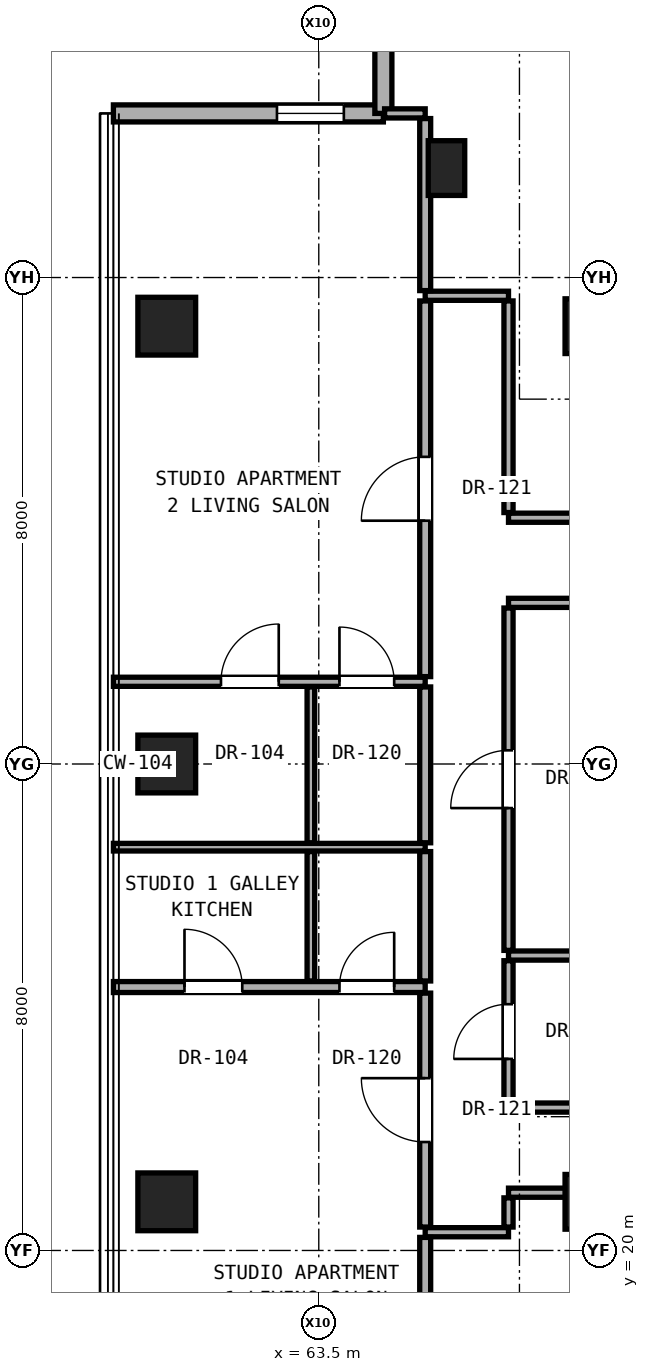
"""IFC4 building model, lengths in metres.
Left out: names, types, materials, properties, quantities, classifications, styles, units other than length and angle.
Written with IfcOpenShell. Run it as: python <this file> out.ifc"""

import sys

from ifc_helpers import new_model, si_unit, direction, frame, frame_2d, origin, origin_2d, place, context, subcontext, project, spatial, rectangle, hollow_rectangle, extrude, element, fill, save


model = new_model("IFC4")
c1 = context("Model", 3, precision=1e-05, world=origin(), true_north=direction((0.0, 1.0)))
c2 = subcontext(c1, "Body", "Model", "MODEL_VIEW")
j1 = project(units=[si_unit("LENGTHUNIT", "METRE"), si_unit("PLANEANGLEUNIT", "RADIAN")], contexts=[c1])
p1 = place(None, origin())
s1 = spatial("IfcSite", under=j1, at=p1, CompositionType="ELEMENT")
p2 = place(p1, origin())
s2 = spatial("IfcBuilding", under=s1, at=p2, CompositionType="ELEMENT")
p3 = place(p2, frame((0.0, 0.0, 183.65)))
s3 = spatial("IfcBuildingStorey", under=s2, at=p3, CompositionType="ELEMENT", Elevation=183.65)
for number, where, z_axis, x_axis in (
    (1, (68.0, 20.8, 0.0), (0.0, 0.0, 1.0), (1.0, 0.0, 0.0)),
    (2, (68.0, 35.2, 0.0), (0.0, 0.0, 1.0), (1.0, 0.0, 0.0)),
):
    element("IfcColumn", number, at=place(p3, frame(where, z_axis=z_axis, x_axis=x_axis)), inside=s3, PredefinedType="COLUMN", context=c2, shape_type="SweptSolid", body=[
        extrude(rectangle(XDim=0.9, YDim=0.9, at=origin_2d()), origin(), (0.0, 0.0, 1.0), 3.25),
    ])
for number, where, z_axis, x_axis in (
    (3, (61.0, 20.8, 0.0), (0.0, 0.0, 1.0), (1.0, 0.0, 0.0)),
    (4, (61.0, 28.0, 0.0), (0.0, 0.0, 1.0), (1.0, 0.0, 0.0)),
    (5, (61.0, 35.2, 0.0), (0.0, 0.0, 1.0), (1.0, 0.0, 0.0)),
):
    element("IfcColumn", number, at=place(p3, frame(where, z_axis=z_axis, x_axis=x_axis)), inside=s3, PredefinedType="COLUMN", context=c2, shape_type="SweptSolid", body=[
        extrude(hollow_rectangle(XDim=0.95, YDim=0.95, WallThickness=0.05, at=origin_2d()), origin(), (0.0, 0.0, 1.0), 3.25),
    ])
p4 = place(p3, frame((65.6, 37.8, 0.0), z_axis=(0.0, 0.0, 1.0), x_axis=(1.0, 0.0, 0.0)))
e6 = element("IfcColumn", 6, at=p4, inside=s3, PredefinedType="PILASTER", context=c2, shape_type="SweptSolid", body=[
    extrude(rectangle(XDim=0.6, YDim=0.9, at=origin_2d()), origin(), (0.0, 0.0, 1.0), 3.25),
])
p5 = place(p3, frame((64.562, 38.699, 0.0), z_axis=(0.0, 0.0, 1.0), x_axis=(-1.0, 0.0, 0.0)))
e7 = element("IfcWall", 7, at=p5, inside=s3, PredefinedType="SOLIDWALL", context=c2, shape_type="SweptSolid", body=[
    extrude(rectangle(XDim=4.44, YDim=0.28, at=frame_2d((2.22, 0.0))), origin(), (0.0, 0.0, 1.0), 3.03),
])
p6 = place(p5, frame((0.65, 0.0, 0.85)))
e8 = element("IfcOpeningElement", 8, at=p6, cuts=e7, PredefinedType="OPENING", context=c2, shape_type="SweptSolid", body=[
    extrude(rectangle(XDim=1.1, YDim=2.0, at=frame_2d((0.55, 1.0))), frame((0.0, 0.15, 0.0), z_axis=(0.0, -1.0, 0.0), x_axis=(1.0, 0.0, 0.0)), (0.0, 0.0, 1.0), 0.3),
])
p7 = place(p3, frame((64.562, 43.138, 0.0), z_axis=(0.0, 0.0, 1.0), x_axis=(0.0, -1.0, 0.0)))
e9 = element("IfcWall", 9, at=p7, inside=s3, PredefinedType="SOLIDWALL", context=c2, shape_type="SweptSolid", body=[
    extrude(rectangle(XDim=4.44, YDim=0.28, at=frame_2d((2.22, 0.0))), origin(), (0.0, 0.0, 1.0), 3.03),
])
p8 = place(p3, frame((65.25, 20.3, 0.0), z_axis=(0.0, 0.0, 1.0), x_axis=(1.0, 0.0, 0.0)))
e10 = element("IfcWall", 10, at=p8, inside=s3, PredefinedType="PARTITIONING", context=c2, shape_type="SweptSolid", body=[
    extrude(rectangle(XDim=1.37, YDim=0.15, at=frame_2d((0.685, 0.0))), origin(), (0.0, 0.0, 1.0), 3.05),
])
p9 = place(p3, frame((66.62, 20.95, 0.0), z_axis=(0.0, 0.0, 1.0), x_axis=(1.0, 0.0, 0.0)))
e11 = element("IfcWall", 11, at=p9, inside=s3, PredefinedType="PARTITIONING", context=c2, shape_type="SweptSolid", body=[
    extrude(rectangle(XDim=1.11, YDim=0.15, at=frame_2d((0.555, 0.0))), origin(), (0.0, 0.0, 1.0), 2.442),
])
p10 = place(p3, frame((66.62, 22.35, 0.0), z_axis=(0.0, 0.0, 1.0), x_axis=(1.0, 0.0, 0.0)))
e12 = element("IfcWall", 12, at=p10, inside=s3, PredefinedType="PARTITIONING", context=c2, shape_type="SweptSolid", body=[
    extrude(rectangle(XDim=10.14, YDim=0.15, at=frame_2d((5.07, 0.0))), origin(), (0.0, 0.0, 1.0), 2.186),
])
p11 = place(p3, frame((60.123, 24.332, 0.0), z_axis=(0.0, 0.0, 1.0), x_axis=(1.0, 0.0, 0.0)))
e13 = element("IfcWall", 13, at=p11, inside=s3, PredefinedType="PARTITIONING", context=c2, shape_type="SweptSolid", body=[
    extrude(rectangle(XDim=5.127, YDim=0.18, at=frame_2d((2.563, 0.0))), origin(), (0.0, 0.0, 1.0), 2.269),
])
p12 = place(p11, frame((1.168, 0.0, 0.0)))
e14 = element("IfcOpeningElement", 14, at=p12, cuts=e13, PredefinedType="OPENING", context=c2, shape_type="SweptSolid", body=[
    extrude(rectangle(XDim=0.95, YDim=2.15, at=frame_2d((0.475, 1.075))), frame((0.0, 0.1, 0.0), z_axis=(0.0, -1.0, 0.0), x_axis=(1.0, 0.0, 0.0)), (0.0, 0.0, 1.0), 0.2),
])
p13 = place(p11, frame((3.717, 0.0, 0.0)))
e15 = element("IfcOpeningElement", 15, at=p13, cuts=e13, PredefinedType="OPENING", context=c2, shape_type="SweptSolid", body=[
    extrude(rectangle(XDim=0.9, YDim=2.1, at=frame_2d((0.45, 1.05))), frame((0.0, 0.1, 0.0), z_axis=(0.0, -1.0, 0.0), x_axis=(1.0, 0.0, 0.0)), (0.0, 0.0, 1.0), 0.2),
])
p14 = place(p3, frame((66.62, 24.85, 0.0), z_axis=(0.0, 0.0, 1.0), x_axis=(1.0, 0.0, 0.0)))
e16 = element("IfcWall", 16, at=p14, inside=s3, PredefinedType="PARTITIONING", context=c2, shape_type="SweptSolid", body=[
    extrude(rectangle(XDim=3.13, YDim=0.15, at=frame_2d((1.565, 0.0))), origin(), (0.0, 0.0, 1.0), 2.186),
])
p15 = place(p3, frame((60.123, 26.632, 0.0), z_axis=(0.0, 0.0, 1.0), x_axis=(1.0, 0.0, 0.0)))
e17 = element("IfcWall", 17, at=p15, inside=s3, PredefinedType="PARTITIONING", context=c2, shape_type="SweptSolid", body=[
    extrude(rectangle(XDim=5.127, YDim=0.125, at=frame_2d((2.563, 0.0))), origin(), (0.0, 0.0, 1.0), 2.269),
])
p16 = place(p3, frame((60.123, 29.352, 0.0), z_axis=(0.0, 0.0, 1.0), x_axis=(1.0, 0.0, 0.0)))
e18 = element("IfcWall", 18, at=p16, inside=s3, PredefinedType="PARTITIONING", context=c2, shape_type="SweptSolid", body=[
    extrude(rectangle(XDim=5.127, YDim=0.15, at=frame_2d((2.563, 0.0))), origin(), (0.0, 0.0, 1.0), 2.269),
])
p17 = place(p16, frame((1.769, 0.0, 0.0)))
e19 = element("IfcOpeningElement", 19, at=p17, cuts=e18, PredefinedType="OPENING", context=c2, shape_type="SweptSolid", body=[
    extrude(rectangle(XDim=0.95, YDim=2.15, at=frame_2d((0.475, 1.075))), frame((0.0, 0.085, 0.0), z_axis=(0.0, -1.0, 0.0), x_axis=(1.0, 0.0, 0.0)), (0.0, 0.0, 1.0), 0.17),
])
p18 = place(p16, frame((3.717, 0.0, 0.0)))
e20 = element("IfcOpeningElement", 20, at=p18, cuts=e18, PredefinedType="OPENING", context=c2, shape_type="SweptSolid", body=[
    extrude(rectangle(XDim=0.9, YDim=2.1, at=frame_2d((0.45, 1.05))), frame((0.0, 0.085, 0.0), z_axis=(0.0, -1.0, 0.0), x_axis=(1.0, 0.0, 0.0)), (0.0, 0.0, 1.0), 0.17),
])
p19 = place(p3, frame((66.62, 30.65, 0.0), z_axis=(0.0, 0.0, 1.0), x_axis=(1.0, 0.0, 0.0)))
e21 = element("IfcWall", 21, at=p19, inside=s3, PredefinedType="PARTITIONING", context=c2, shape_type="SweptSolid", body=[
    extrude(rectangle(XDim=10.14, YDim=0.15, at=frame_2d((5.07, 0.0))), origin(), (0.0, 0.0, 1.0), 2.186),
])
p20 = place(p19, frame((6.14, 0.0, 0.0)))
e22 = element("IfcOpeningElement", 22, at=p20, cuts=e21, PredefinedType="OPENING", context=c2, shape_type="SweptSolid", body=[
    extrude(rectangle(XDim=0.95, YDim=2.15, at=frame_2d((0.475, 1.075))), frame((0.0, 0.085, 0.0), z_axis=(0.0, -1.0, 0.0), x_axis=(1.0, 0.0, 0.0)), (0.0, 0.0, 1.0), 0.17),
])
p21 = place(p3, frame((66.62, 32.05, 0.0), z_axis=(0.0, 0.0, 1.0), x_axis=(1.0, 0.0, 0.0)))
e23 = element("IfcWall", 23, at=p21, inside=s3, PredefinedType="PARTITIONING", context=c2, shape_type="SweptSolid", body=[
    extrude(rectangle(XDim=2.18, YDim=0.15, at=frame_2d((1.09, 0.0))), origin(), (0.0, 0.0, 1.0), 2.186),
])
p22 = place(p3, frame((65.25, 35.7, 0.0), z_axis=(0.0, 0.0, 1.0), x_axis=(1.0, 0.0, 0.0)))
e24 = element("IfcWall", 24, at=p22, inside=s3, PredefinedType="PARTITIONING", context=c2, shape_type="SweptSolid", body=[
    extrude(rectangle(XDim=1.37, YDim=0.15, at=frame_2d((0.685, 0.0))), origin(), (0.0, 0.0, 1.0), 3.05),
])
p23 = place(p3, frame((64.582, 38.699, 0.0), z_axis=(0.0, 0.0, 1.0), x_axis=(1.0, 0.0, 0.0)))
e25 = element("IfcWall", 25, at=p23, inside=s3, PredefinedType="PARTITIONING", context=c2, shape_type="SweptSolid", body=[
    extrude(rectangle(XDim=0.668, YDim=0.15, at=frame_2d((0.334, 0.0))), origin(), (0.0, 0.0, 1.0), 3.05),
])
p24 = place(p3, frame((63.37, 24.432, 0.0), z_axis=(0.0, 0.0, 1.0), x_axis=(0.0, 1.0, 0.0)))
e26 = element("IfcWall", 26, at=p24, inside=s3, PredefinedType="PARTITIONING", context=c2, shape_type="SweptSolid", body=[
    extrude(rectangle(XDim=2.128, YDim=0.125, at=frame_2d((1.064, 0.0))), origin(), (0.0, 0.0, 1.0), 3.05),
])
p25 = place(p3, frame((63.37, 26.705, 0.0), z_axis=(0.0, 0.0, 1.0), x_axis=(0.0, 1.0, 0.0)))
e27 = element("IfcWall", 27, at=p25, inside=s3, PredefinedType="PARTITIONING", context=c2, shape_type="SweptSolid", body=[
    extrude(rectangle(XDim=2.562, YDim=0.125, at=frame_2d((1.281, 0.0))), origin(), (0.0, 0.0, 1.0), 2.346),
])
p26 = place(p3, frame((65.25, 17.401, 0.0), z_axis=(0.0, 0.0, 1.0), x_axis=(0.0, 1.0, 0.0)))
e28 = element("IfcWall", 28, at=p26, inside=s3, PredefinedType="PARTITIONING", context=c2, shape_type="SweptSolid", body=[
    extrude(rectangle(XDim=2.814, YDim=0.18, at=frame_2d((1.407, 0.0))), origin(), (0.0, 0.0, 1.0), 2.493),
])
p27 = place(p3, frame((65.25, 20.385, 0.0), z_axis=(0.0, 0.0, 1.0), x_axis=(0.0, 1.0, 0.0)))
e29 = element("IfcWall", 29, at=p27, inside=s3, PredefinedType="PARTITIONING", context=c2, shape_type="SweptSolid", body=[
    extrude(rectangle(XDim=3.847, YDim=0.18, at=frame_2d((1.923, 0.0))), origin(), (0.0, 0.0, 1.0), 2.442),
])
p28 = place(p27, frame((1.398, 0.0, 0.0)))
e30 = element("IfcOpeningElement", 30, at=p28, cuts=e29, PredefinedType="OPENING", context=c2, shape_type="SweptSolid", body=[
    extrude(rectangle(XDim=1.05, YDim=2.2, at=frame_2d((0.525, 1.1))), frame((0.0, 0.1, 0.0), z_axis=(0.0, -1.0, 0.0), x_axis=(1.0, 0.0, 0.0)), (0.0, 0.0, 1.0), 0.2),
])
p29 = place(p3, frame((65.25, 24.432, 0.0), z_axis=(0.0, 0.0, 1.0), x_axis=(0.0, 1.0, 0.0)))
e31 = element("IfcWall", 31, at=p29, inside=s3, PredefinedType="PARTITIONING", context=c2, shape_type="SweptSolid", body=[
    extrude(rectangle(XDim=2.128, YDim=0.18, at=frame_2d((1.064, 0.0))), origin(), (0.0, 0.0, 1.0), 3.05),
])
p30 = place(p3, frame((65.25, 26.705, 0.0), z_axis=(0.0, 0.0, 1.0), x_axis=(0.0, 1.0, 0.0)))
e32 = element("IfcWall", 32, at=p30, inside=s3, PredefinedType="PARTITIONING", context=c2, shape_type="SweptSolid", body=[
    extrude(rectangle(XDim=2.562, YDim=0.18, at=frame_2d((1.281, 0.0))), origin(), (0.0, 0.0, 1.0), 2.346),
])
p31 = place(p3, frame((65.25, 29.437, 0.0), z_axis=(0.0, 0.0, 1.0), x_axis=(0.0, 1.0, 0.0)))
e33 = element("IfcWall", 33, at=p31, inside=s3, PredefinedType="PARTITIONING", context=c2, shape_type="SweptSolid", body=[
    extrude(rectangle(XDim=6.178, YDim=0.18, at=frame_2d((3.089, 0.0))), origin(), (0.0, 0.0, 1.0), 2.442),
])
p32 = place(p31, frame((2.564, 0.0, 0.0)))
e34 = element("IfcOpeningElement", 34, at=p32, cuts=e33, PredefinedType="OPENING", context=c2, shape_type="SweptSolid", body=[
    extrude(rectangle(XDim=1.05, YDim=2.2, at=frame_2d((0.525, 1.1))), frame((0.0, 0.1, 0.0), z_axis=(0.0, -1.0, 0.0), x_axis=(1.0, 0.0, 0.0)), (0.0, 0.0, 1.0), 0.2),
])
p33 = place(p3, frame((65.25, 35.785, 0.0), z_axis=(0.0, 0.0, 1.0), x_axis=(0.0, 1.0, 0.0)))
e35 = element("IfcWall", 35, at=p33, inside=s3, PredefinedType="PARTITIONING", context=c2, shape_type="SweptSolid", body=[
    extrude(rectangle(XDim=2.829, YDim=0.18, at=frame_2d((1.415, 0.0))), origin(), (0.0, 0.0, 1.0), 2.493),
])
p34 = place(p3, frame((66.62, 20.385, 0.0), z_axis=(0.0, 0.0, 1.0), x_axis=(0.0, 1.0, 0.0)))
e36 = element("IfcWall", 36, at=p34, inside=s3, PredefinedType="PARTITIONING", context=c2, shape_type="SweptSolid", body=[
    extrude(rectangle(XDim=0.48, YDim=0.15, at=frame_2d((0.24, 0.0))), origin(), (0.0, 0.0, 1.0), 2.442),
])
p35 = place(p3, frame((66.62, 22.435, 0.0), z_axis=(0.0, 0.0, 1.0), x_axis=(0.0, 1.0, 0.0)))
e37 = element("IfcWall", 37, at=p35, inside=s3, PredefinedType="PARTITIONING", context=c2, shape_type="SweptSolid", body=[
    extrude(rectangle(XDim=2.33, YDim=0.15, at=frame_2d((1.165, 0.0))), origin(), (0.0, 0.0, 1.0), 3.05),
])
p36 = place(p35, frame((0.715, 0.0, 0.0)))
e38 = element("IfcOpeningElement", 38, at=p36, cuts=e37, PredefinedType="OPENING", context=c2, shape_type="SweptSolid", body=[
    extrude(rectangle(XDim=0.9, YDim=2.1, at=frame_2d((0.45, 1.05))), frame((0.0, 0.085, 0.0), z_axis=(0.0, -1.0, 0.0), x_axis=(1.0, 0.0, 0.0)), (0.0, 0.0, 1.0), 0.17),
])
p37 = place(p3, frame((66.62, 24.935, 0.0), z_axis=(0.0, 0.0, 1.0), x_axis=(0.0, 1.0, 0.0)))
e39 = element("IfcWall", 39, at=p37, inside=s3, PredefinedType="PARTITIONING", context=c2, shape_type="SweptSolid", body=[
    extrude(rectangle(XDim=5.63, YDim=0.15, at=frame_2d((2.815, 0.0))), origin(), (0.0, 0.0, 1.0), 2.346),
])
p38 = place(p37, frame((2.34, 0.0, 0.0)))
e40 = element("IfcOpeningElement", 40, at=p38, cuts=e39, PredefinedType="OPENING", context=c2, shape_type="SweptSolid", body=[
    extrude(rectangle(XDim=0.95, YDim=2.15, at=frame_2d((0.475, 1.075))), frame((0.0, 0.085, 0.0), z_axis=(0.0, -1.0, 0.0), x_axis=(1.0, 0.0, 0.0)), (0.0, 0.0, 1.0), 0.17),
])
p39 = place(p3, frame((66.62, 32.135, 0.0), z_axis=(0.0, 0.0, 1.0), x_axis=(0.0, 1.0, 0.0)))
e41 = element("IfcWall", 41, at=p39, inside=s3, PredefinedType="PARTITIONING", context=c2, shape_type="SweptSolid", body=[
    extrude(rectangle(XDim=3.48, YDim=0.15, at=frame_2d((1.74, 0.0))), origin(), (0.0, 0.0, 1.0), 2.442),
])
p40 = place(p6, origin())
e42 = element("IfcWindow", 42, at=p40, inside=s3, PartitioningType="SINGLE_PANEL", PredefinedType="WINDOW", context=c2, shape_type="SweptSolid", body=[
    extrude(rectangle(XDim=1.1, YDim=2.0, at=frame_2d((0.55, 1.0))), frame((0.0, 0.03, 0.0), z_axis=(0.0, -1.0, 0.0), x_axis=(1.0, 0.0, 0.0)), (0.0, 0.0, 1.0), 0.06),
])
fill(e8, e42)
p41 = place(p36, origin())
e43 = element("IfcDoor", 43, at=p41, inside=s3, OperationType="SINGLE_SWING_LEFT", PredefinedType="DOOR", context=c2, shape_type="SweptSolid", body=[
    extrude(rectangle(XDim=0.9, YDim=2.1, at=frame_2d((0.45, 1.05))), frame((0.0, 0.025, 0.0), z_axis=(0.0, -1.0, 0.0), x_axis=(1.0, 0.0, 0.0)), (0.0, 0.0, 1.0), 0.05),
])
fill(e38, e43)
p42 = place(p28, origin())
e44 = element("IfcDoor", 44, at=p42, inside=s3, OperationType="SINGLE_SWING_RIGHT", PredefinedType="DOOR", context=c2, shape_type="SweptSolid", body=[
    extrude(rectangle(XDim=1.05, YDim=2.2, at=frame_2d((0.525, 1.1))), frame((0.0, 0.025, 0.0), z_axis=(0.0, -1.0, 0.0), x_axis=(1.0, 0.0, 0.0)), (0.0, 0.0, 1.0), 0.05),
])
fill(e30, e44)
p43 = place(p12, origin())
e45 = element("IfcDoor", 45, at=p43, inside=s3, OperationType="SINGLE_SWING_LEFT", PredefinedType="DOOR", context=c2, shape_type="SweptSolid", body=[
    extrude(rectangle(XDim=0.95, YDim=2.15, at=frame_2d((0.475, 1.075))), frame((0.0, 0.025, 0.0), z_axis=(0.0, -1.0, 0.0), x_axis=(1.0, 0.0, 0.0)), (0.0, 0.0, 1.0), 0.05),
])
fill(e14, e45)
p44 = place(p13, origin())
e46 = element("IfcDoor", 46, at=p44, inside=s3, OperationType="SINGLE_SWING_RIGHT", PredefinedType="DOOR", context=c2, shape_type="SweptSolid", body=[
    extrude(rectangle(XDim=0.9, YDim=2.1, at=frame_2d((0.45, 1.05))), frame((0.0, 0.025, 0.0), z_axis=(0.0, -1.0, 0.0), x_axis=(1.0, 0.0, 0.0)), (0.0, 0.0, 1.0), 0.05),
])
fill(e15, e46)
p45 = place(p32, origin())
e47 = element("IfcDoor", 47, at=p45, inside=s3, OperationType="SINGLE_SWING_LEFT", PredefinedType="DOOR", context=c2, shape_type="SweptSolid", body=[
    extrude(rectangle(XDim=1.05, YDim=2.2, at=frame_2d((0.525, 1.1))), frame((0.0, 0.025, 0.0), z_axis=(0.0, -1.0, 0.0), x_axis=(1.0, 0.0, 0.0)), (0.0, 0.0, 1.0), 0.05),
])
fill(e34, e47)
p46 = place(p17, origin())
e48 = element("IfcDoor", 48, at=p46, inside=s3, OperationType="SINGLE_SWING_RIGHT", PredefinedType="DOOR", context=c2, shape_type="SweptSolid", body=[
    extrude(rectangle(XDim=0.95, YDim=2.15, at=frame_2d((0.475, 1.075))), frame((0.0, 0.025, 0.0), z_axis=(0.0, -1.0, 0.0), x_axis=(1.0, 0.0, 0.0)), (0.0, 0.0, 1.0), 0.05),
])
fill(e19, e48)
p47 = place(p18, origin())
e49 = element("IfcDoor", 49, at=p47, inside=s3, OperationType="SINGLE_SWING_LEFT", PredefinedType="DOOR", context=c2, shape_type="SweptSolid", body=[
    extrude(rectangle(XDim=0.9, YDim=2.1, at=frame_2d((0.45, 1.05))), frame((0.0, 0.025, 0.0), z_axis=(0.0, -1.0, 0.0), x_axis=(1.0, 0.0, 0.0)), (0.0, 0.0, 1.0), 0.05),
])
fill(e20, e49)
p48 = place(p38, origin())
e50 = element("IfcDoor", 50, at=p48, inside=s3, OperationType="SINGLE_SWING_LEFT", PredefinedType="DOOR", context=c2, shape_type="SweptSolid", body=[
    extrude(rectangle(XDim=0.95, YDim=2.15, at=frame_2d((0.475, 1.075))), frame((0.0, 0.025, 0.0), z_axis=(0.0, -1.0, 0.0), x_axis=(1.0, 0.0, 0.0)), (0.0, 0.0, 1.0), 0.05),
])
fill(e40, e50)
save(model, sys.argv[1])
